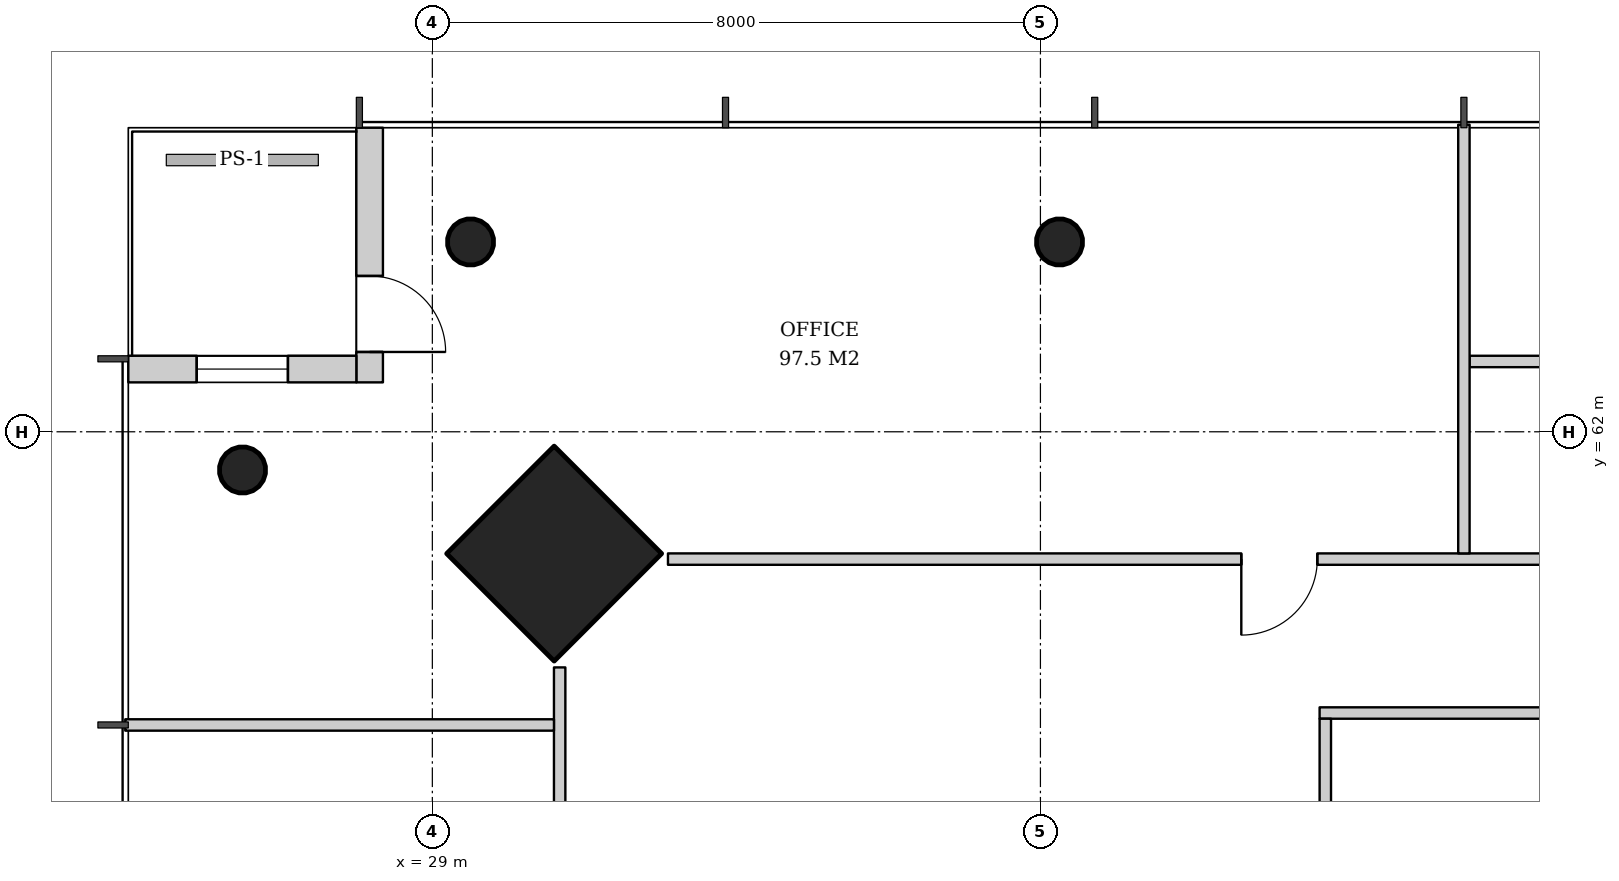
"""IFC4 building model, lengths in metres.
Left out: names, types, materials, properties, quantities, classifications, styles, units other than length and angle.
Written with IfcOpenShell. Run it as: python <this file> out.ifc"""

import sys

from ifc_helpers import new_model, si_unit, direction, frame, frame_2d, origin, origin_2d, place, context, subcontext, project, spatial, rectangle, hollow_circle, extrude, element, fill, save


model = new_model("IFC4")
c1 = context("Model", 3, precision=1e-05, world=origin(), true_north=direction((0.0, 1.0)))
c2 = subcontext(c1, "Body", "Model", "MODEL_VIEW")
j1 = project(units=[si_unit("LENGTHUNIT", "METRE"), si_unit("PLANEANGLEUNIT", "RADIAN")], contexts=[c1])
p1 = place(None, origin())
s1 = spatial("IfcSite", under=j1, at=p1, CompositionType="ELEMENT")
p2 = place(p1, origin())
s2 = spatial("IfcBuilding", under=s1, at=p2, CompositionType="ELEMENT")
p3 = place(p2, frame((0.0, 0.0, 192.0)))
s3 = spatial("IfcBuildingStorey", under=s2, at=p3, CompositionType="ELEMENT", Elevation=192.0)
p4 = place(p3, frame((30.564, 60.436, 0.0), z_axis=(0.031962158256, -0.031962158256, 0.998977898093), x_axis=(0.707106781187, 0.707106781187, 0.0)))
e1 = element("IfcColumn", 1, at=p4, inside=s3, PredefinedType="COLUMN", context=c2, shape_type="SweptSolid", body=[
    extrude(rectangle(XDim=2.0, YDim=2.0, at=origin_2d()), origin(), (0.0, 0.0, 1.0), 3.804),
])
p5 = place(p3, frame((29.464, 64.536, 0.0), z_axis=(0.031898107953, -0.031898107953, 0.998981992539), x_axis=(0.707106781187, 0.707106781187, 0.0)))
e2 = element("IfcColumn", 2, at=p5, inside=s3, PredefinedType="COLUMN", context=c2, shape_type="SweptSolid", body=[
    extrude(hollow_circle(Radius=0.305, WallThickness=0.025, at=origin_2d()), origin(), (0.0, 0.0, 1.0), 3.804),
])
p6 = place(p3, frame((37.232, 64.536, 0.0), z_axis=(0.015987237665, -0.031910269556, 0.999362868496), x_axis=(0.894067115991, 0.447933021895, 0.0)))
e3 = element("IfcColumn", 3, at=p6, inside=s3, PredefinedType="COLUMN", context=c2, shape_type="SweptSolid", body=[
    extrude(hollow_circle(Radius=0.305, WallThickness=0.025, at=origin_2d()), origin(), (0.0, 0.0, 1.0), 3.802),
])
p7 = place(p3, frame((26.464, 61.536, 0.0), z_axis=(0.031898107953, -0.031898107953, 0.998981992539), x_axis=(0.707106781187, 0.707106781187, 0.0)))
e4 = element("IfcColumn", 4, at=p7, inside=s3, PredefinedType="COLUMN", context=c2, shape_type="SweptSolid", body=[
    extrude(hollow_circle(Radius=0.305, WallThickness=0.025, at=origin_2d()), origin(), (0.0, 0.0, 1.0), 3.804),
])
p8 = place(p3, frame((28.175, 66.0, 0.0), z_axis=(0.0, 0.0, 1.0), x_axis=(0.0, -1.0, 0.0)))
e5 = element("IfcWall", 5, at=p8, inside=s3, PredefinedType="SOLIDWALL", context=c2, shape_type="SweptSolid", body=[
    extrude(rectangle(XDim=3.35, YDim=0.35, at=frame_2d((1.675, 0.0))), origin(), (0.0, 0.0, 1.0), 3.62),
])
p9 = place(p8, frame((1.95, 0.0, 0.0)))
e6 = element("IfcOpeningElement", 6, at=p9, cuts=e5, PredefinedType="OPENING", context=c2, shape_type="SweptSolid", body=[
    extrude(rectangle(XDim=1.0, YDim=2.4, at=frame_2d((0.5, 1.2))), frame((0.0, 0.185, 0.0), z_axis=(0.0, -1.0, 0.0), x_axis=(1.0, 0.0, 0.0)), (0.0, 0.0, 1.0), 0.37),
])
p10 = place(p3, frame((28.0, 62.825, 0.0), z_axis=(0.0, 0.0, 1.0), x_axis=(-1.0, 0.0, 0.0)))
e7 = element("IfcWall", 7, at=p10, inside=s3, PredefinedType="SOLIDWALL", context=c2, shape_type="SweptSolid", body=[
    extrude(rectangle(XDim=3.0, YDim=0.35, at=frame_2d((1.5, 0.0))), origin(), (0.0, 0.0, 1.0), 3.62),
])
p11 = place(p10, frame((0.9, 0.0, 0.6)))
e8 = element("IfcOpeningElement", 8, at=p11, cuts=e7, PredefinedType="OPENING", context=c2, shape_type="SweptSolid", body=[
    extrude(rectangle(XDim=1.2, YDim=2.55, at=frame_2d((0.6, 1.275))), frame((0.0, 0.185, 0.0), z_axis=(0.0, -1.0, 0.0), x_axis=(1.0, 0.0, 0.0)), (0.0, 0.0, 1.0), 0.37),
])
p12 = place(p3, frame((48.515, 58.3, 0.0), z_axis=(0.0, 0.0, 1.0), x_axis=(-1.0, 0.0, 0.0)))
e9 = element("IfcWall", 9, at=p12, inside=s3, PredefinedType="PARTITIONING", context=c2, shape_type="SweptSolid", body=[
    extrude(rectangle(XDim=7.842, YDim=0.15, at=frame_2d((3.921, 0.0))), origin(), (0.0, 0.0, 1.0), 2.867),
])
p13 = place(p12, frame((3.421, 0.0, 0.0)))
e10 = element("IfcOpeningElement", 10, at=p13, cuts=e9, PredefinedType="OPENING", context=c2, shape_type="SweptSolid", body=[
    extrude(rectangle(XDim=1.0, YDim=2.1, at=frame_2d((0.5, 1.05))), frame((0.0, 0.085, 0.0), z_axis=(0.0, -1.0, 0.0), x_axis=(1.0, 0.0, 0.0)), (0.0, 0.0, 1.0), 0.17),
])
p14 = place(p3, frame((40.748, 55.9, 0.0), z_axis=(0.0, 0.0, 1.0), x_axis=(0.0, 1.0, 0.0)))
e11 = element("IfcWall", 11, at=p14, inside=s3, PredefinedType="PARTITIONING", context=c2, shape_type="SweptSolid", body=[
    extrude(rectangle(XDim=2.325, YDim=0.15, at=frame_2d((1.163, 0.0))), origin(), (0.0, 0.0, 1.0), 3.62),
])
p15 = place(p3, frame((47.354, 62.925, 0.0), z_axis=(0.0, 0.0, 1.0), x_axis=(-1.0, 0.0, 0.0)))
e12 = element("IfcWall", 12, at=p15, inside=s3, PredefinedType="PARTITIONING", context=c2, shape_type="SweptSolid", body=[
    extrude(rectangle(XDim=4.707, YDim=0.15, at=frame_2d((2.354, 0.0))), origin(), (0.0, 0.0, 1.0), 2.867),
])
p16 = place(p3, frame((57.9, 60.325, 0.0), z_axis=(0.0, 0.0, 1.0), x_axis=(-1.0, 0.0, 0.0)))
e13 = element("IfcWall", 13, at=p16, inside=s3, PredefinedType="PARTITIONING", context=c2, shape_type="SweptSolid", body=[
    extrude(rectangle(XDim=25.8, YDim=0.15, at=frame_2d((12.9, 0.0))), origin(), (0.0, 0.0, 1.0), 2.867),
])
p17 = place(p16, frame((2.686, 0.0, 0.0)))
e14 = element("IfcOpeningElement", 14, at=p17, cuts=e13, PredefinedType="OPENING", context=c2, shape_type="SweptSolid", body=[
    extrude(rectangle(XDim=1.0, YDim=2.1, at=frame_2d((0.5, 1.05))), frame((0.0, 0.085, 0.0), z_axis=(0.0, -1.0, 0.0), x_axis=(1.0, 0.0, 0.0)), (0.0, 0.0, 1.0), 0.17),
])
p18 = place(p16, frame((7.543, 0.0, 0.0)))
e15 = element("IfcOpeningElement", 15, at=p18, cuts=e13, PredefinedType="OPENING", context=c2, shape_type="SweptSolid", body=[
    extrude(rectangle(XDim=1.0, YDim=2.1, at=frame_2d((0.5, 1.05))), frame((0.0, 0.085, 0.0), z_axis=(0.0, -1.0, 0.0), x_axis=(1.0, 0.0, 0.0)), (0.0, 0.0, 1.0), 0.17),
])
p19 = place(p16, frame((12.4, 0.0, 0.0)))
e16 = element("IfcOpeningElement", 16, at=p19, cuts=e13, PredefinedType="OPENING", context=c2, shape_type="SweptSolid", body=[
    extrude(rectangle(XDim=1.0, YDim=2.1, at=frame_2d((0.5, 1.05))), frame((0.0, 0.085, 0.0), z_axis=(0.0, -1.0, 0.0), x_axis=(1.0, 0.0, 0.0)), (0.0, 0.0, 1.0), 0.17),
])
p20 = place(p16, frame((17.257, 0.0, 0.0)))
e17 = element("IfcOpeningElement", 17, at=p20, cuts=e13, PredefinedType="OPENING", context=c2, shape_type="SweptSolid", body=[
    extrude(rectangle(XDim=1.0, YDim=2.1, at=frame_2d((0.5, 1.05))), frame((0.0, 0.085, 0.0), z_axis=(0.0, -1.0, 0.0), x_axis=(1.0, 0.0, 0.0)), (0.0, 0.0, 1.0), 0.17),
])
p21 = place(p3, frame((42.572, 60.4, 0.0), z_axis=(0.0, 0.0, 1.0), x_axis=(0.0, 1.0, 0.0)))
e18 = element("IfcWall", 18, at=p21, inside=s3, PredefinedType="PARTITIONING", context=c2, shape_type="SweptSolid", body=[
    extrude(rectangle(XDim=5.64, YDim=0.15, at=frame_2d((2.82, 0.0))), origin(), (0.0, 0.0, 1.0), 2.867),
])
p22 = place(p3, frame((30.675, 58.9, 0.0), z_axis=(0.0, 0.0, 1.0), x_axis=(0.0, -1.0, 0.0)))
e19 = element("IfcWall", 19, at=p22, inside=s3, PredefinedType="PARTITIONING", context=c2, shape_type="SweptSolid", body=[
    extrude(rectangle(XDim=25.8, YDim=0.15, at=frame_2d((12.9, 0.0))), origin(), (0.0, 0.0, 1.0), 2.867),
])
p23 = place(p22, frame((2.686, 0.0, 0.0)))
e20 = element("IfcOpeningElement", 20, at=p23, cuts=e19, PredefinedType="OPENING", context=c2, shape_type="SweptSolid", body=[
    extrude(rectangle(XDim=1.0, YDim=2.1, at=frame_2d((0.5, 1.05))), frame((0.0, 0.085, 0.0), z_axis=(0.0, -1.0, 0.0), x_axis=(1.0, 0.0, 0.0)), (0.0, 0.0, 1.0), 0.17),
])
p24 = place(p22, frame((7.143, 0.0, 0.0)))
e21 = element("IfcOpeningElement", 21, at=p24, cuts=e19, PredefinedType="OPENING", context=c2, shape_type="SweptSolid", body=[
    extrude(rectangle(XDim=1.8, YDim=2.4, at=frame_2d((0.9, 1.2))), frame((0.0, 0.085, 0.0), z_axis=(0.0, -1.0, 0.0), x_axis=(1.0, 0.0, 0.0)), (0.0, 0.0, 1.0), 0.17),
])
p25 = place(p22, frame((12.5, 0.0, 0.0)))
e22 = element("IfcOpeningElement", 22, at=p25, cuts=e19, PredefinedType="OPENING", context=c2, shape_type="SweptSolid", body=[
    extrude(rectangle(XDim=0.8, YDim=2.1, at=frame_2d((0.4, 1.05))), frame((0.0, 0.085, 0.0), z_axis=(0.0, -1.0, 0.0), x_axis=(1.0, 0.0, 0.0)), (0.0, 0.0, 1.0), 0.17),
])
p26 = place(p22, frame((17.257, 0.0, 0.0)))
e23 = element("IfcOpeningElement", 23, at=p26, cuts=e19, PredefinedType="OPENING", context=c2, shape_type="SweptSolid", body=[
    extrude(rectangle(XDim=1.0, YDim=2.1, at=frame_2d((0.5, 1.05))), frame((0.0, 0.085, 0.0), z_axis=(0.0, -1.0, 0.0), x_axis=(1.0, 0.0, 0.0)), (0.0, 0.0, 1.0), 0.17),
])
p27 = place(p22, frame((22.214, 0.0, 0.0)))
e24 = element("IfcOpeningElement", 24, at=p27, cuts=e19, PredefinedType="OPENING", context=c2, shape_type="SweptSolid", body=[
    extrude(rectangle(XDim=0.8, YDim=2.1, at=frame_2d((0.4, 1.05))), frame((0.0, 0.085, 0.0), z_axis=(0.0, -1.0, 0.0), x_axis=(1.0, 0.0, 0.0)), (0.0, 0.0, 1.0), 0.17),
])
p28 = place(p3, frame((30.6, 58.143, 0.0), z_axis=(0.0, 0.0, 1.0), x_axis=(-1.0, 0.0, 0.0)))
e25 = element("IfcWall", 25, at=p28, inside=s3, PredefinedType="PARTITIONING", context=c2, shape_type="SweptSolid", body=[
    extrude(rectangle(XDim=5.64, YDim=0.15, at=frame_2d((2.82, 0.0))), origin(), (0.0, 0.0, 1.0), 3.12),
])
p29 = place(p9, origin())
e26 = element("IfcDoor", 26, at=p29, inside=s3, OperationType="SINGLE_SWING_RIGHT", PredefinedType="DOOR", context=c2, shape_type="SweptSolid", body=[
    extrude(rectangle(XDim=1.0, YDim=2.4, at=frame_2d((0.5, 1.2))), frame((0.0, 0.025, 0.0), z_axis=(0.0, -1.0, 0.0), x_axis=(1.0, 0.0, 0.0)), (0.0, 0.0, 1.0), 0.05),
])
fill(e6, e26)
p30 = place(p11, origin())
e27 = element("IfcWindow", 27, at=p30, inside=s3, PartitioningType="SINGLE_PANEL", PredefinedType="WINDOW", context=c2, shape_type="SweptSolid", body=[
    extrude(rectangle(XDim=1.2, YDim=2.55, at=frame_2d((0.6, 1.275))), frame((0.0, 0.03, 0.0), z_axis=(0.0, -1.0, 0.0), x_axis=(1.0, 0.0, 0.0)), (0.0, 0.0, 1.0), 0.06),
])
fill(e8, e27)
p31 = place(p20, origin())
e28 = element("IfcDoor", 28, at=p31, inside=s3, OperationType="SINGLE_SWING_RIGHT", PredefinedType="DOOR", context=c2, shape_type="SweptSolid", body=[
    extrude(rectangle(XDim=1.0, YDim=2.1, at=frame_2d((0.5, 1.05))), frame((0.0, 0.025, 0.0), z_axis=(0.0, -1.0, 0.0), x_axis=(1.0, 0.0, 0.0)), (0.0, 0.0, 1.0), 0.05),
])
fill(e17, e28)
save(model, sys.argv[1])
